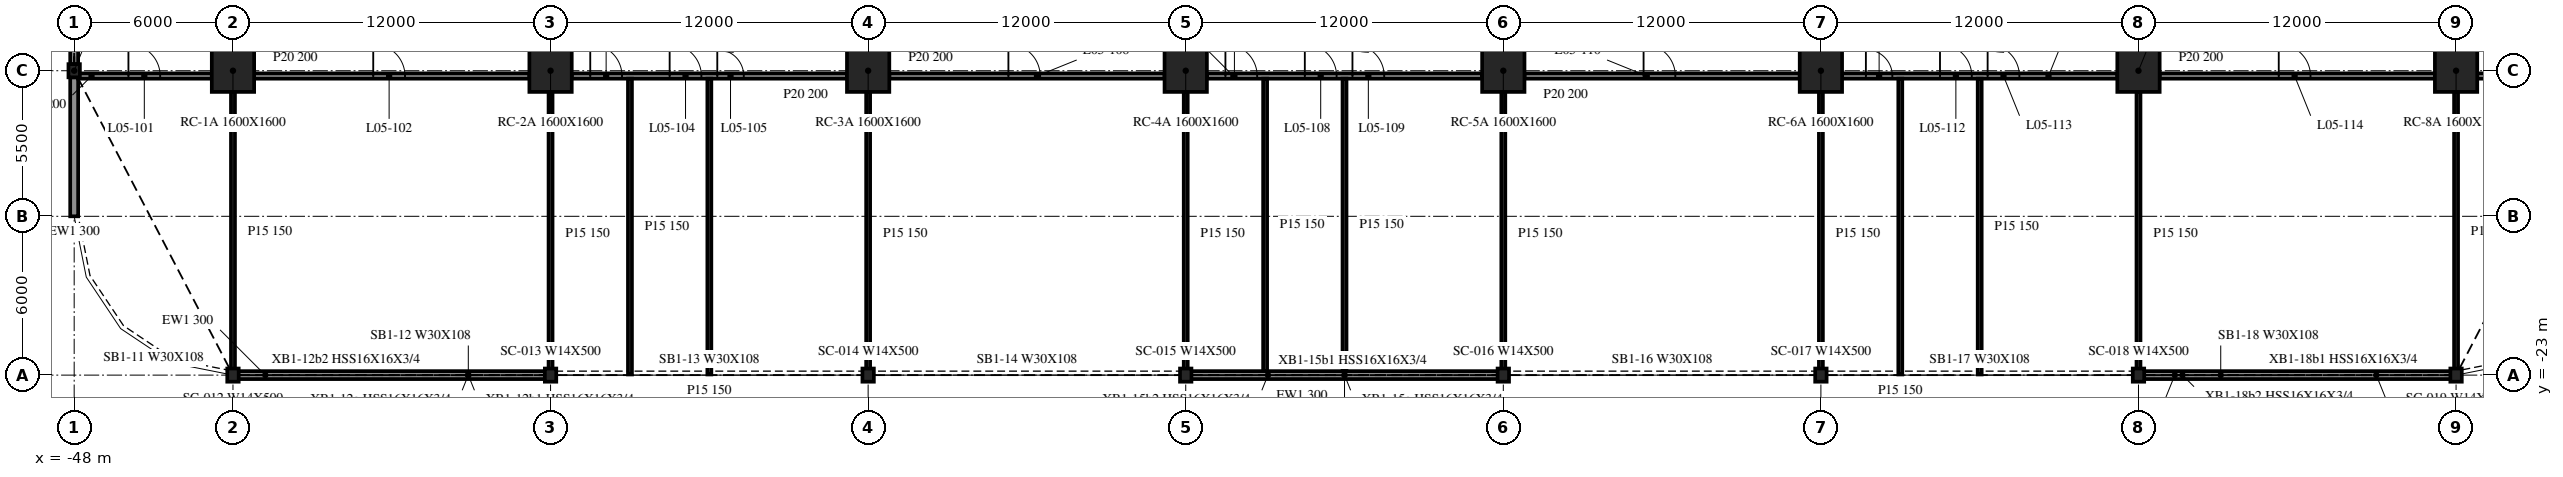
"""IFC4 building model, lengths in metres.
Left out: names, types, materials, properties, quantities, classifications, styles, units other than length and angle.
Written with IfcOpenShell. Run it as: python <this file> out.ifc"""

import sys

from ifc_helpers import new_model, si_unit, direction, frame, frame_2d, origin, origin_2d, place, context, subcontext, project, spatial, rectangle, i_section, extrude, element, fill, save


model = new_model("IFC4")
c1 = context("Model", 3, precision=1e-05, world=origin(), true_north=direction((0.0, 1.0)))
c2 = subcontext(c1, "Body", "Model", "MODEL_VIEW")
j1 = project(units=[si_unit("LENGTHUNIT", "METRE"), si_unit("PLANEANGLEUNIT", "RADIAN")], contexts=[c1])
p1 = place(None, origin())
s1 = spatial("IfcSite", under=j1, at=p1, CompositionType="ELEMENT")
p2 = place(p1, origin())
s2 = spatial("IfcBuilding", under=s1, at=p2, CompositionType="ELEMENT")
p3 = place(p2, frame((0.0, 0.0, 24.4)))
s3 = spatial("IfcBuildingStorey", under=s2, at=p3, CompositionType="ELEMENT", Elevation=24.4)
for number, where, z_axis, x_axis in (
    (1, (-42.0, -11.5, -0.34), (0.0, 0.0, 1.0), (1.0, 0.0, 0.0)),
    (2, (-30.0, -11.5, -0.34), (0.0, 0.0, 1.0), (1.0, 0.0, 0.0)),
    (3, (-18.0, -11.5, -0.34), (0.0, 0.0, 1.0), (1.0, 0.0, 0.0)),
    (4, (-6.0, -11.5, -0.34), (0.0, 0.0, 1.0), (1.0, 0.0, 0.0)),
    (5, (6.0, -11.5, -0.34), (0.0, 0.0, 1.0), (1.0, 0.0, 0.0)),
    (6, (18.0, -11.5, -0.34), (0.0, 0.0, 1.0), (1.0, 0.0, 0.0)),
    (7, (30.0, -11.5, -0.34), (0.0, 0.0, 1.0), (1.0, 0.0, 0.0)),
    (8, (42.0, -11.5, -0.34), (0.0, 0.0, 1.0), (1.0, 0.0, 0.0)),
):
    element("IfcColumn", number, at=place(p3, frame(where, z_axis=z_axis, x_axis=x_axis)), inside=s3, PredefinedType="COLUMN", context=c2, shape_type="SweptSolid", body=[
        extrude(rectangle(XDim=1.6, YDim=1.6, at=origin_2d()), origin(), (0.0, 0.0, 1.0), 4.3),
    ])
for number, where, z_axis, x_axis in (
    (9, (-48.0, -11.5, -0.34), (0.0, 0.0, 1.0), (1.0, 0.0, 0.0)),
    (10, (-42.0, -23.0, -0.34), (0.0, 0.0, 1.0), (1.0, 0.0, 0.0)),
    (11, (-30.0, -23.0, -0.34), (0.0, 0.0, 1.0), (1.0, 0.0, 0.0)),
    (12, (-18.0, -23.0, -0.34), (0.0, 0.0, 1.0), (1.0, 0.0, 0.0)),
    (13, (-6.0, -23.0, -0.34), (0.0, 0.0, 1.0), (1.0, 0.0, 0.0)),
    (14, (6.0, -23.0, -0.34), (0.0, 0.0, 1.0), (1.0, 0.0, 0.0)),
    (15, (18.0, -23.0, -0.34), (0.0, 0.0, 1.0), (1.0, 0.0, 0.0)),
    (16, (30.0, -23.0, -0.34), (0.0, 0.0, 1.0), (1.0, 0.0, 0.0)),
    (17, (42.0, -23.0, -0.34), (0.0, 0.0, 1.0), (1.0, 0.0, 0.0)),
):
    element("IfcColumn", number, at=place(p3, frame(where, z_axis=z_axis, x_axis=x_axis)), inside=s3, PredefinedType="COLUMN", context=c2, shape_type="SweptSolid", body=[
        extrude(i_section(OverallWidth=0.432, OverallDepth=0.498, WebThickness=0.056, FlangeThickness=0.089, at=origin_2d()), origin(), (0.0, 0.0, 1.0), 4.3),
    ])
p4 = place(p3, frame((-48.0, -0.249, 0.0), z_axis=(0.0, 0.0, 1.0), x_axis=(0.0, -1.0, 0.0)))
e18 = element("IfcWall", 18, at=p4, inside=s3, PredefinedType="NOTDEFINED", context=c2, shape_type="SweptSolid", body=[
    extrude(rectangle(XDim=11.002, YDim=0.3, at=frame_2d((5.501, 0.0))), origin(), (0.0, 0.0, 1.0), 3.203),
])
p5 = place(p3, frame((-48.0, -11.749, 0.0), z_axis=(0.0, 0.0, 1.0), x_axis=(0.0, -1.0, 0.0)))
e19 = element("IfcWall", 19, at=p5, inside=s3, PredefinedType="NOTDEFINED", context=c2, shape_type="SweptSolid", body=[
    extrude(rectangle(XDim=5.251, YDim=0.3, at=frame_2d((2.625, 0.0))), origin(), (0.0, 0.0, 1.0), 3.203),
])
for number, where, z_axis, x_axis in (
    (20, (-41.972, -23.0, 0.0), (0.0, 0.0, 1.0), (1.0, 0.0, 0.0)),
    (21, (-5.972, -23.0, 0.0), (0.0, 0.0, 1.0), (1.0, 0.0, 0.0)),
    (22, (30.028, -23.0, 0.0), (0.0, 0.0, 1.0), (1.0, 0.0, 0.0)),
):
    element("IfcWall", number, at=place(p3, frame(where, z_axis=z_axis, x_axis=x_axis)), inside=s3, PredefinedType="NOTDEFINED", context=c2, shape_type="SweptSolid", body=[
        extrude(rectangle(XDim=11.944, YDim=0.3, at=frame_2d((5.972, 0.0))), origin(), (0.0, 0.0, 1.0), 3.203),
    ])
p6 = place(p3, frame((-47.85, -11.7, 0.0), z_axis=(0.0, 0.0, 1.0), x_axis=(1.0, 0.0, 0.0)))
e23 = element("IfcWall", 23, at=p6, inside=s3, PredefinedType="PARTITIONING", context=c2, shape_type="SweptSolid", body=[
    extrude(rectangle(XDim=5.05, YDim=0.2, at=frame_2d((2.525, 0.0))), origin(), (0.0, 0.0, 1.0), 3.96),
])
p7 = place(p6, frame((1.9, 0.0, 0.0)))
e24 = element("IfcOpeningElement", 24, at=p7, cuts=e23, PredefinedType="OPENING", context=c2, shape_type="SweptSolid", body=[
    extrude(rectangle(XDim=1.2, YDim=2.1, at=frame_2d((0.6, 1.05))), frame((0.0, 0.11, 0.0), z_axis=(0.0, -1.0, 0.0), x_axis=(1.0, 0.0, 0.0)), (0.0, 0.0, 1.0), 0.22),
])
p8 = place(p3, frame((-41.2, -11.7, 0.0), z_axis=(0.0, 0.0, 1.0), x_axis=(1.0, 0.0, 0.0)))
e25 = element("IfcWall", 25, at=p8, inside=s3, PredefinedType="PARTITIONING", context=c2, shape_type="SweptSolid", body=[
    extrude(rectangle(XDim=10.4, YDim=0.2, at=frame_2d((5.2, 0.0))), origin(), (0.0, 0.0, 1.0), 3.96),
])
p9 = place(p8, frame((4.5, 0.0, 0.0)))
e26 = element("IfcOpeningElement", 26, at=p9, cuts=e25, PredefinedType="OPENING", context=c2, shape_type="SweptSolid", body=[
    extrude(rectangle(XDim=1.2, YDim=2.1, at=frame_2d((0.6, 1.05))), frame((0.0, 0.11, 0.0), z_axis=(0.0, -1.0, 0.0), x_axis=(1.0, 0.0, 0.0)), (0.0, 0.0, 1.0), 0.22),
])
p10 = place(p3, frame((-29.2, -11.7, 0.0), z_axis=(0.0, 0.0, 1.0), x_axis=(1.0, 0.0, 0.0)))
e27 = element("IfcWall", 27, at=p10, inside=s3, PredefinedType="PARTITIONING", context=c2, shape_type="SweptSolid", body=[
    extrude(rectangle(XDim=10.4, YDim=0.2, at=frame_2d((5.2, 0.0))), origin(), (0.0, 0.0, 1.0), 3.96),
])
p11 = place(p10, frame((0.7, 0.0, 0.0)))
e28 = element("IfcOpeningElement", 28, at=p11, cuts=e27, PredefinedType="OPENING", context=c2, shape_type="SweptSolid", body=[
    extrude(rectangle(XDim=1.2, YDim=2.1, at=frame_2d((0.6, 1.05))), frame((0.0, 0.11, 0.0), z_axis=(0.0, -1.0, 0.0), x_axis=(1.0, 0.0, 0.0)), (0.0, 0.0, 1.0), 0.22),
])
p12 = place(p10, frame((3.7, 0.0, 0.0)))
e29 = element("IfcOpeningElement", 29, at=p12, cuts=e27, PredefinedType="OPENING", context=c2, shape_type="SweptSolid", body=[
    extrude(rectangle(XDim=1.2, YDim=2.1, at=frame_2d((0.6, 1.05))), frame((0.0, 0.11, 0.0), z_axis=(0.0, -1.0, 0.0), x_axis=(1.0, 0.0, 0.0)), (0.0, 0.0, 1.0), 0.22),
])
p13 = place(p10, frame((5.5, 0.0, 0.0)))
e30 = element("IfcOpeningElement", 30, at=p13, cuts=e27, PredefinedType="OPENING", context=c2, shape_type="SweptSolid", body=[
    extrude(rectangle(XDim=1.0, YDim=2.1, at=frame_2d((0.5, 1.05))), frame((0.0, 0.11, 0.0), z_axis=(0.0, -1.0, 0.0), x_axis=(1.0, 0.0, 0.0)), (0.0, 0.0, 1.0), 0.22),
])
p14 = place(p3, frame((-17.2, -11.7, 0.0), z_axis=(0.0, 0.0, 1.0), x_axis=(1.0, 0.0, 0.0)))
e31 = element("IfcWall", 31, at=p14, inside=s3, PredefinedType="PARTITIONING", context=c2, shape_type="SweptSolid", body=[
    extrude(rectangle(XDim=10.4, YDim=0.2, at=frame_2d((5.2, 0.0))), origin(), (0.0, 0.0, 1.0), 3.96),
])
p15 = place(p14, frame((4.5, 0.0, 0.0)))
e32 = element("IfcOpeningElement", 32, at=p15, cuts=e31, PredefinedType="OPENING", context=c2, shape_type="SweptSolid", body=[
    extrude(rectangle(XDim=1.2, YDim=2.1, at=frame_2d((0.6, 1.05))), frame((0.0, 0.11, 0.0), z_axis=(0.0, -1.0, 0.0), x_axis=(1.0, 0.0, 0.0)), (0.0, 0.0, 1.0), 0.22),
])
p16 = place(p3, frame((-5.2, -11.7, 0.0), z_axis=(0.0, 0.0, 1.0), x_axis=(1.0, 0.0, 0.0)))
e33 = element("IfcWall", 33, at=p16, inside=s3, PredefinedType="PARTITIONING", context=c2, shape_type="SweptSolid", body=[
    extrude(rectangle(XDim=10.4, YDim=0.2, at=frame_2d((5.2, 0.0))), origin(), (0.0, 0.0, 1.0), 3.96),
])
p17 = place(p16, frame((0.7, 0.0, 0.0)))
e34 = element("IfcOpeningElement", 34, at=p17, cuts=e33, PredefinedType="OPENING", context=c2, shape_type="SweptSolid", body=[
    extrude(rectangle(XDim=1.2, YDim=2.1, at=frame_2d((0.6, 1.05))), frame((0.0, 0.11, 0.0), z_axis=(0.0, -1.0, 0.0), x_axis=(1.0, 0.0, 0.0)), (0.0, 0.0, 1.0), 0.22),
])
p18 = place(p16, frame((3.7, 0.0, 0.0)))
e35 = element("IfcOpeningElement", 35, at=p18, cuts=e33, PredefinedType="OPENING", context=c2, shape_type="SweptSolid", body=[
    extrude(rectangle(XDim=1.2, YDim=2.1, at=frame_2d((0.6, 1.05))), frame((0.0, 0.11, 0.0), z_axis=(0.0, -1.0, 0.0), x_axis=(1.0, 0.0, 0.0)), (0.0, 0.0, 1.0), 0.22),
])
p19 = place(p16, frame((5.5, 0.0, 0.0)))
e36 = element("IfcOpeningElement", 36, at=p19, cuts=e33, PredefinedType="OPENING", context=c2, shape_type="SweptSolid", body=[
    extrude(rectangle(XDim=1.2, YDim=2.1, at=frame_2d((0.6, 1.05))), frame((0.0, 0.11, 0.0), z_axis=(0.0, -1.0, 0.0), x_axis=(1.0, 0.0, 0.0)), (0.0, 0.0, 1.0), 0.22),
])
p20 = place(p3, frame((6.8, -11.7, 0.0), z_axis=(0.0, 0.0, 1.0), x_axis=(1.0, 0.0, 0.0)))
e37 = element("IfcWall", 37, at=p20, inside=s3, PredefinedType="PARTITIONING", context=c2, shape_type="SweptSolid", body=[
    extrude(rectangle(XDim=10.4, YDim=0.2, at=frame_2d((5.2, 0.0))), origin(), (0.0, 0.0, 1.0), 3.96),
])
p21 = place(p20, frame((4.5, 0.0, 0.0)))
e38 = element("IfcOpeningElement", 38, at=p21, cuts=e37, PredefinedType="OPENING", context=c2, shape_type="SweptSolid", body=[
    extrude(rectangle(XDim=1.2, YDim=2.1, at=frame_2d((0.6, 1.05))), frame((0.0, 0.11, 0.0), z_axis=(0.0, -1.0, 0.0), x_axis=(1.0, 0.0, 0.0)), (0.0, 0.0, 1.0), 0.22),
])
p22 = place(p3, frame((18.8, -11.7, 0.0), z_axis=(0.0, 0.0, 1.0), x_axis=(1.0, 0.0, 0.0)))
e39 = element("IfcWall", 39, at=p22, inside=s3, PredefinedType="PARTITIONING", context=c2, shape_type="SweptSolid", body=[
    extrude(rectangle(XDim=10.4, YDim=0.2, at=frame_2d((5.2, 0.0))), origin(), (0.0, 0.0, 1.0), 3.96),
])
p23 = place(p22, frame((0.9, 0.0, 0.0)))
e40 = element("IfcOpeningElement", 40, at=p23, cuts=e39, PredefinedType="OPENING", context=c2, shape_type="SweptSolid", body=[
    extrude(rectangle(XDim=1.0, YDim=2.1, at=frame_2d((0.5, 1.05))), frame((0.0, 0.11, 0.0), z_axis=(0.0, -1.0, 0.0), x_axis=(1.0, 0.0, 0.0)), (0.0, 0.0, 1.0), 0.22),
])
p24 = place(p22, frame((3.7, 0.0, 0.0)))
e41 = element("IfcOpeningElement", 41, at=p24, cuts=e39, PredefinedType="OPENING", context=c2, shape_type="SweptSolid", body=[
    extrude(rectangle(XDim=1.2, YDim=2.1, at=frame_2d((0.6, 1.05))), frame((0.0, 0.11, 0.0), z_axis=(0.0, -1.0, 0.0), x_axis=(1.0, 0.0, 0.0)), (0.0, 0.0, 1.0), 0.22),
])
p25 = place(p22, frame((5.5, 0.0, 0.0)))
e42 = element("IfcOpeningElement", 42, at=p25, cuts=e39, PredefinedType="OPENING", context=c2, shape_type="SweptSolid", body=[
    extrude(rectangle(XDim=1.2, YDim=2.1, at=frame_2d((0.6, 1.05))), frame((0.0, 0.11, 0.0), z_axis=(0.0, -1.0, 0.0), x_axis=(1.0, 0.0, 0.0)), (0.0, 0.0, 1.0), 0.22),
])
p26 = place(p3, frame((30.8, -11.7, 0.0), z_axis=(0.0, 0.0, 1.0), x_axis=(1.0, 0.0, 0.0)))
e43 = element("IfcWall", 43, at=p26, inside=s3, PredefinedType="PARTITIONING", context=c2, shape_type="SweptSolid", body=[
    extrude(rectangle(XDim=10.4, YDim=0.2, at=frame_2d((5.2, 0.0))), origin(), (0.0, 0.0, 1.0), 3.96),
])
p27 = place(p26, frame((4.5, 0.0, 0.0)))
e44 = element("IfcOpeningElement", 44, at=p27, cuts=e43, PredefinedType="OPENING", context=c2, shape_type="SweptSolid", body=[
    extrude(rectangle(XDim=1.2, YDim=2.1, at=frame_2d((0.6, 1.05))), frame((0.0, 0.11, 0.0), z_axis=(0.0, -1.0, 0.0), x_axis=(1.0, 0.0, 0.0)), (0.0, 0.0, 1.0), 0.22),
])
p28 = place(p3, frame((42.8, -11.7, 0.0), z_axis=(0.0, 0.0, 1.0), x_axis=(1.0, 0.0, 0.0)))
e45 = element("IfcWall", 45, at=p28, inside=s3, PredefinedType="PARTITIONING", context=c2, shape_type="SweptSolid", body=[
    extrude(rectangle(XDim=5.05, YDim=0.2, at=frame_2d((2.525, 0.0))), origin(), (0.0, 0.0, 1.0), 3.96),
])
p29 = place(p28, frame((1.9, 0.0, 0.0)))
e46 = element("IfcOpeningElement", 46, at=p29, cuts=e45, PredefinedType="OPENING", context=c2, shape_type="SweptSolid", body=[
    extrude(rectangle(XDim=1.2, YDim=2.1, at=frame_2d((0.6, 1.05))), frame((0.0, 0.11, 0.0), z_axis=(0.0, -1.0, 0.0), x_axis=(1.0, 0.0, 0.0)), (0.0, 0.0, 1.0), 0.22),
])
p30 = place(p3, frame((-42.0, -22.847, 0.0), z_axis=(0.0, 0.0, 1.0), x_axis=(0.0, 1.0, 0.0)))
e47 = element("IfcWall", 47, at=p30, inside=s3, PredefinedType="PARTITIONING", context=c2, shape_type="SweptSolid", body=[
    extrude(rectangle(XDim=10.547, YDim=0.15, at=frame_2d((5.273, 0.0))), origin(), (0.0, 0.0, 1.0), 3.96),
])
p31 = place(p3, frame((-30.0, -22.975, 0.0), z_axis=(0.0, 0.0, 1.0), x_axis=(0.0, 1.0, 0.0)))
e48 = element("IfcWall", 48, at=p31, inside=s3, PredefinedType="PARTITIONING", context=c2, shape_type="SweptSolid", body=[
    extrude(rectangle(XDim=10.675, YDim=0.15, at=frame_2d((5.337, 0.0))), origin(), (0.0, 0.0, 1.0), 3.96),
])
for number, where, z_axis, x_axis in (
    (49, (-27.0, -22.975, 0.0), (0.0, 0.0, 1.0), (0.0, 1.0, 0.0)),
    (50, (-24.0, -22.975, 0.0), (0.0, 0.0, 1.0), (0.0, 1.0, 0.0)),
):
    element("IfcWall", number, at=place(p3, frame(where, z_axis=z_axis, x_axis=x_axis)), inside=s3, PredefinedType="PARTITIONING", context=c2, shape_type="SweptSolid", body=[
        extrude(rectangle(XDim=11.175, YDim=0.15, at=frame_2d((5.587, 0.0))), origin(), (0.0, 0.0, 1.0), 3.96),
    ])
for number, where, z_axis, x_axis in (
    (51, (-18.0, -22.975, 0.0), (0.0, 0.0, 1.0), (0.0, 1.0, 0.0)),
    (52, (-6.0, -22.975, 0.0), (0.0, 0.0, 1.0), (0.0, 1.0, 0.0)),
):
    element("IfcWall", number, at=place(p3, frame(where, z_axis=z_axis, x_axis=x_axis)), inside=s3, PredefinedType="PARTITIONING", context=c2, shape_type="SweptSolid", body=[
        extrude(rectangle(XDim=10.675, YDim=0.15, at=frame_2d((5.337, 0.0))), origin(), (0.0, 0.0, 1.0), 3.96),
    ])
for number, where, z_axis, x_axis in (
    (53, (-3.0, -22.85, 0.0), (0.0, 0.0, 1.0), (0.0, 1.0, 0.0)),
    (54, (0.0, -22.85, 0.0), (0.0, 0.0, 1.0), (0.0, 1.0, 0.0)),
):
    element("IfcWall", number, at=place(p3, frame(where, z_axis=z_axis, x_axis=x_axis)), inside=s3, PredefinedType="PARTITIONING", context=c2, shape_type="SweptSolid", body=[
        extrude(rectangle(XDim=11.05, YDim=0.15, at=frame_2d((5.525, 0.0))), origin(), (0.0, 0.0, 1.0), 3.96),
    ])
for number, where, z_axis, x_axis in (
    (55, (6.0, -22.975, 0.0), (0.0, 0.0, 1.0), (0.0, 1.0, 0.0)),
    (56, (18.0, -22.975, 0.0), (0.0, 0.0, 1.0), (0.0, 1.0, 0.0)),
):
    element("IfcWall", number, at=place(p3, frame(where, z_axis=z_axis, x_axis=x_axis)), inside=s3, PredefinedType="PARTITIONING", context=c2, shape_type="SweptSolid", body=[
        extrude(rectangle(XDim=10.675, YDim=0.15, at=frame_2d((5.337, 0.0))), origin(), (0.0, 0.0, 1.0), 3.96),
    ])
for number, where, z_axis, x_axis in (
    (57, (21.0, -22.975, 0.0), (0.0, 0.0, 1.0), (0.0, 1.0, 0.0)),
    (58, (24.0, -22.975, 0.0), (0.0, 0.0, 1.0), (0.0, 1.0, 0.0)),
):
    element("IfcWall", number, at=place(p3, frame(where, z_axis=z_axis, x_axis=x_axis)), inside=s3, PredefinedType="PARTITIONING", context=c2, shape_type="SweptSolid", body=[
        extrude(rectangle(XDim=11.175, YDim=0.15, at=frame_2d((5.587, 0.0))), origin(), (0.0, 0.0, 1.0), 3.96),
    ])
p32 = place(p3, frame((30.0, -22.975, 0.0), z_axis=(0.0, 0.0, 1.0), x_axis=(0.0, 1.0, 0.0)))
e59 = element("IfcWall", 59, at=p32, inside=s3, PredefinedType="PARTITIONING", context=c2, shape_type="SweptSolid", body=[
    extrude(rectangle(XDim=10.675, YDim=0.15, at=frame_2d((5.337, 0.0))), origin(), (0.0, 0.0, 1.0), 3.96),
])
p33 = place(p3, frame((42.0, -22.847, 0.0), z_axis=(0.0, 0.0, 1.0), x_axis=(0.0, 1.0, 0.0)))
e60 = element("IfcWall", 60, at=p33, inside=s3, PredefinedType="PARTITIONING", context=c2, shape_type="SweptSolid", body=[
    extrude(rectangle(XDim=10.547, YDim=0.15, at=frame_2d((5.273, 0.0))), origin(), (0.0, 0.0, 1.0), 3.96),
])
p34 = place(p7, origin())
e61 = element("IfcDoor", 61, at=p34, inside=s3, OperationType="SINGLE_SWING_RIGHT", PredefinedType="DOOR", context=c2, shape_type="SweptSolid", body=[
    extrude(rectangle(XDim=1.2, YDim=2.1, at=frame_2d((0.6, 1.05))), frame((0.0, 0.025, 0.0), z_axis=(0.0, -1.0, 0.0), x_axis=(1.0, 0.0, 0.0)), (0.0, 0.0, 1.0), 0.05),
])
fill(e24, e61)
p35 = place(p9, origin())
e62 = element("IfcDoor", 62, at=p35, inside=s3, OperationType="SINGLE_SWING_RIGHT", PredefinedType="DOOR", context=c2, shape_type="SweptSolid", body=[
    extrude(rectangle(XDim=1.2, YDim=2.1, at=frame_2d((0.6, 1.05))), frame((0.0, 0.025, 0.0), z_axis=(0.0, -1.0, 0.0), x_axis=(1.0, 0.0, 0.0)), (0.0, 0.0, 1.0), 0.05),
])
fill(e26, e62)
p36 = place(p11, origin())
e63 = element("IfcDoor", 63, at=p36, inside=s3, OperationType="SINGLE_SWING_RIGHT", PredefinedType="DOOR", context=c2, shape_type="SweptSolid", body=[
    extrude(rectangle(XDim=1.2, YDim=2.1, at=frame_2d((0.6, 1.05))), frame((0.0, 0.025, 0.0), z_axis=(0.0, -1.0, 0.0), x_axis=(1.0, 0.0, 0.0)), (0.0, 0.0, 1.0), 0.05),
])
fill(e28, e63)
p37 = place(p12, origin())
e64 = element("IfcDoor", 64, at=p37, inside=s3, OperationType="SINGLE_SWING_RIGHT", PredefinedType="DOOR", context=c2, shape_type="SweptSolid", body=[
    extrude(rectangle(XDim=1.2, YDim=2.1, at=frame_2d((0.6, 1.05))), frame((0.0, 0.025, 0.0), z_axis=(0.0, -1.0, 0.0), x_axis=(1.0, 0.0, 0.0)), (0.0, 0.0, 1.0), 0.05),
])
fill(e29, e64)
p38 = place(p13, origin())
e65 = element("IfcDoor", 65, at=p38, inside=s3, OperationType="SINGLE_SWING_LEFT", PredefinedType="DOOR", context=c2, shape_type="SweptSolid", body=[
    extrude(rectangle(XDim=1.0, YDim=2.1, at=frame_2d((0.5, 1.05))), frame((0.0, 0.025, 0.0), z_axis=(0.0, -1.0, 0.0), x_axis=(1.0, 0.0, 0.0)), (0.0, 0.0, 1.0), 0.05),
])
fill(e30, e65)
p39 = place(p15, origin())
e66 = element("IfcDoor", 66, at=p39, inside=s3, OperationType="SINGLE_SWING_RIGHT", PredefinedType="DOOR", context=c2, shape_type="SweptSolid", body=[
    extrude(rectangle(XDim=1.2, YDim=2.1, at=frame_2d((0.6, 1.05))), frame((0.0, 0.025, 0.0), z_axis=(0.0, -1.0, 0.0), x_axis=(1.0, 0.0, 0.0)), (0.0, 0.0, 1.0), 0.05),
])
fill(e32, e66)
p40 = place(p17, origin())
e67 = element("IfcDoor", 67, at=p40, inside=s3, OperationType="SINGLE_SWING_RIGHT", PredefinedType="DOOR", context=c2, shape_type="SweptSolid", body=[
    extrude(rectangle(XDim=1.2, YDim=2.1, at=frame_2d((0.6, 1.05))), frame((0.0, 0.025, 0.0), z_axis=(0.0, -1.0, 0.0), x_axis=(1.0, 0.0, 0.0)), (0.0, 0.0, 1.0), 0.05),
])
fill(e34, e67)
p41 = place(p18, origin())
e68 = element("IfcDoor", 68, at=p41, inside=s3, OperationType="SINGLE_SWING_RIGHT", PredefinedType="DOOR", context=c2, shape_type="SweptSolid", body=[
    extrude(rectangle(XDim=1.2, YDim=2.1, at=frame_2d((0.6, 1.05))), frame((0.0, 0.025, 0.0), z_axis=(0.0, -1.0, 0.0), x_axis=(1.0, 0.0, 0.0)), (0.0, 0.0, 1.0), 0.05),
])
fill(e35, e68)
p42 = place(p19, origin())
e69 = element("IfcDoor", 69, at=p42, inside=s3, OperationType="SINGLE_SWING_LEFT", PredefinedType="DOOR", context=c2, shape_type="SweptSolid", body=[
    extrude(rectangle(XDim=1.2, YDim=2.1, at=frame_2d((0.6, 1.05))), frame((0.0, 0.025, 0.0), z_axis=(0.0, -1.0, 0.0), x_axis=(1.0, 0.0, 0.0)), (0.0, 0.0, 1.0), 0.05),
])
fill(e36, e69)
p43 = place(p21, origin())
e70 = element("IfcDoor", 70, at=p43, inside=s3, OperationType="SINGLE_SWING_RIGHT", PredefinedType="DOOR", context=c2, shape_type="SweptSolid", body=[
    extrude(rectangle(XDim=1.2, YDim=2.1, at=frame_2d((0.6, 1.05))), frame((0.0, 0.025, 0.0), z_axis=(0.0, -1.0, 0.0), x_axis=(1.0, 0.0, 0.0)), (0.0, 0.0, 1.0), 0.05),
])
fill(e38, e70)
p44 = place(p23, origin())
e71 = element("IfcDoor", 71, at=p44, inside=s3, OperationType="SINGLE_SWING_RIGHT", PredefinedType="DOOR", context=c2, shape_type="SweptSolid", body=[
    extrude(rectangle(XDim=1.0, YDim=2.1, at=frame_2d((0.5, 1.05))), frame((0.0, 0.025, 0.0), z_axis=(0.0, -1.0, 0.0), x_axis=(1.0, 0.0, 0.0)), (0.0, 0.0, 1.0), 0.05),
])
fill(e40, e71)
p45 = place(p24, origin())
e72 = element("IfcDoor", 72, at=p45, inside=s3, OperationType="SINGLE_SWING_RIGHT", PredefinedType="DOOR", context=c2, shape_type="SweptSolid", body=[
    extrude(rectangle(XDim=1.2, YDim=2.1, at=frame_2d((0.6, 1.05))), frame((0.0, 0.025, 0.0), z_axis=(0.0, -1.0, 0.0), x_axis=(1.0, 0.0, 0.0)), (0.0, 0.0, 1.0), 0.05),
])
fill(e41, e72)
p46 = place(p25, origin())
e73 = element("IfcDoor", 73, at=p46, inside=s3, OperationType="SINGLE_SWING_LEFT", PredefinedType="DOOR", context=c2, shape_type="SweptSolid", body=[
    extrude(rectangle(XDim=1.2, YDim=2.1, at=frame_2d((0.6, 1.05))), frame((0.0, 0.025, 0.0), z_axis=(0.0, -1.0, 0.0), x_axis=(1.0, 0.0, 0.0)), (0.0, 0.0, 1.0), 0.05),
])
fill(e42, e73)
p47 = place(p27, origin())
e74 = element("IfcDoor", 74, at=p47, inside=s3, OperationType="SINGLE_SWING_RIGHT", PredefinedType="DOOR", context=c2, shape_type="SweptSolid", body=[
    extrude(rectangle(XDim=1.2, YDim=2.1, at=frame_2d((0.6, 1.05))), frame((0.0, 0.025, 0.0), z_axis=(0.0, -1.0, 0.0), x_axis=(1.0, 0.0, 0.0)), (0.0, 0.0, 1.0), 0.05),
])
fill(e44, e74)
save(model, sys.argv[1])
